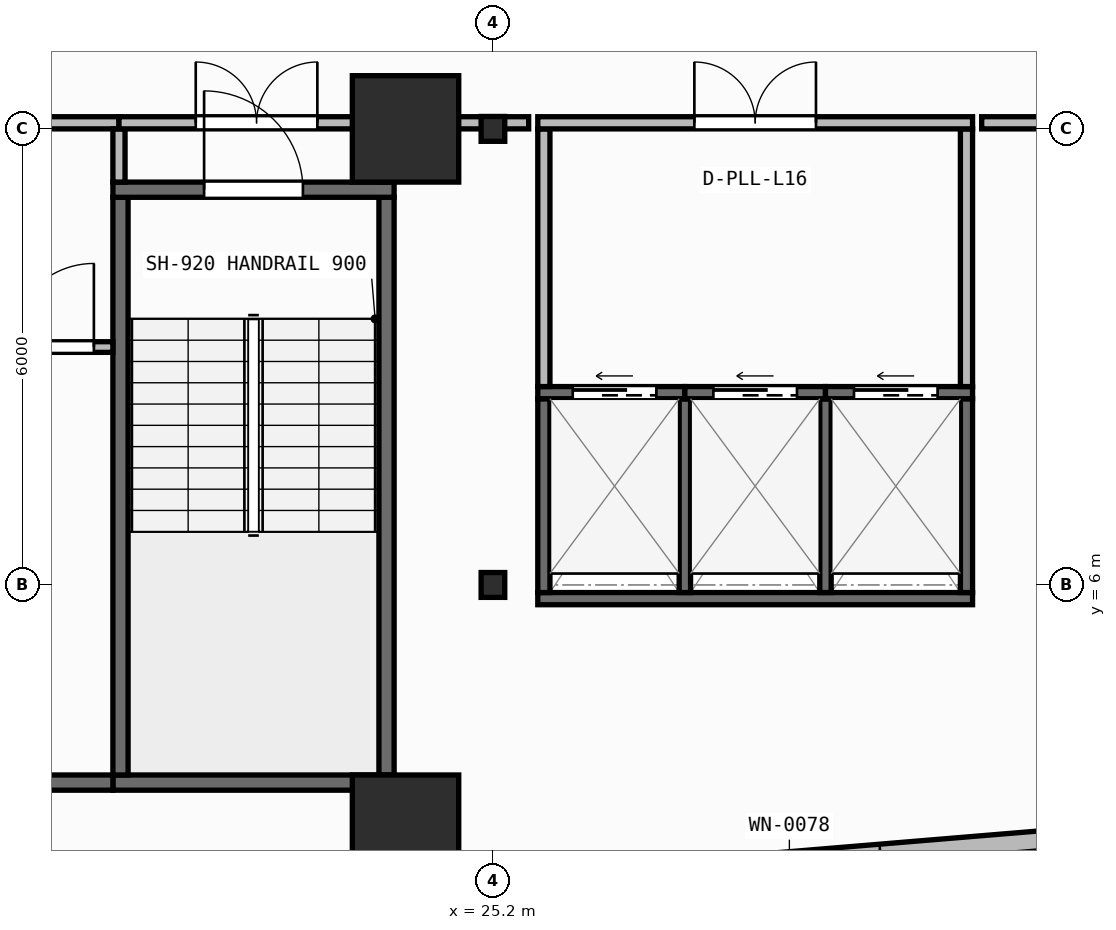
"""IFC4 building model, lengths in metres.
Left out: names, types, materials, properties, quantities, classifications, styles, units other than length and angle.
Written with IfcOpenShell. Run it as: python <this file> out.ifc"""

import sys

from ifc_helpers import new_model, si_unit, direction, frame, frame_2d, origin, origin_2d, place, context, subcontext, project, spatial, rectangle, i_section, extrude, element, fill, save


model = new_model("IFC4")
c1 = context("Model", 3, precision=1e-05, world=origin(), true_north=direction((0.0, 1.0)))
c2 = subcontext(c1, "Body", "Model", "MODEL_VIEW")
j1 = project(units=[si_unit("LENGTHUNIT", "METRE"), si_unit("PLANEANGLEUNIT", "RADIAN")], contexts=[c1])
p1 = place(None, origin())
s1 = spatial("IfcSite", under=j1, at=p1, CompositionType="ELEMENT")
p2 = place(p1, origin())
s2 = spatial("IfcBuilding", under=s1, at=p2, CompositionType="ELEMENT")
p3 = place(p2, frame((0.0, 0.0, 65.95)))
s3 = spatial("IfcBuildingStorey", under=s2, at=p3, CompositionType="ELEMENT", Elevation=65.95)
p4 = place(p3, frame((24.05, 2.8, 0.0), z_axis=(0.0, 0.0, 1.0), x_axis=(1.0, 0.0, 0.0)))
e1 = element("IfcColumn", 1, at=p4, inside=s3, PredefinedType="COLUMN", context=c2, shape_type="SweptSolid", body=[
    extrude(rectangle(XDim=1.4, YDim=1.4, at=origin_2d()), origin(), (0.0, 0.0, 1.0), 3.95),
])
p5 = place(p3, frame((25.2, 6.0, 0.0), z_axis=(0.0, 0.0, 1.0), x_axis=(1.0, 0.0, 0.0)))
e2 = element("IfcColumn", 2, at=p5, inside=s3, PredefinedType="COLUMN", context=c2, shape_type="SweptSolid", body=[
    extrude(i_section(OverallWidth=0.311, OverallDepth=0.327, WebThickness=0.016, FlangeThickness=0.025, FilletRadius=0.017, at=origin_2d()), origin(), (0.0, 0.0, 1.0), 3.95),
])
p6 = place(p3, frame((24.05, 12.0, 0.0), z_axis=(0.0, 0.0, 1.0), x_axis=(1.0, 0.0, 0.0)))
e3 = element("IfcColumn", 3, at=p6, inside=s3, PredefinedType="COLUMN", context=c2, shape_type="SweptSolid", body=[
    extrude(rectangle(XDim=1.4, YDim=1.4, at=origin_2d()), origin(), (0.0, 0.0, 1.0), 3.95),
])
p7 = place(p3, frame((25.2, 12.0, 0.0), z_axis=(0.0, 0.0, 1.0), x_axis=(1.0, 0.0, 0.0)))
e4 = element("IfcColumn", 4, at=p7, inside=s3, PredefinedType="COLUMN", context=c2, shape_type="SweptSolid", body=[
    extrude(i_section(OverallWidth=0.311, OverallDepth=0.327, WebThickness=0.016, FlangeThickness=0.025, FilletRadius=0.017, at=origin_2d()), origin(), (0.0, 0.0, 1.0), 3.95),
])
p8 = place(p3, frame((2.76, 0.174, 0.0), z_axis=(0.0, 0.0, 1.0), x_axis=(0.996571478456, 0.082736257641, 0.0)))
e5 = element("IfcWall", 5, at=p8, inside=s3, PredefinedType="STANDARD", context=c2, shape_type="SweptSolid", body=[
    extrude(rectangle(XDim=52.861, YDim=0.26, at=frame_2d((26.431, 0.0))), origin(), (0.0, 0.0, 1.0), 3.71),
])
p9 = place(p8, frame((25.231, 0.0, 0.9)))
e6 = element("IfcOpeningElement", 6, at=p9, cuts=e5, PredefinedType="OPENING", context=c2, shape_type="SweptSolid", body=[
    extrude(rectangle(XDim=2.4, YDim=1.65, at=frame_2d((1.2, 0.825))), frame((0.0, 0.14, 0.0), z_axis=(0.0, -1.0, 0.0), x_axis=(1.0, 0.0, 0.0)), (0.0, 0.0, 1.0), 0.28),
])
p10 = place(p3, frame((20.2, 3.4, 0.0), z_axis=(0.0, 0.0, 1.0), x_axis=(1.0, 0.0, 0.0)))
e7 = element("IfcWall", 7, at=p10, inside=s3, PredefinedType="SHEAR", context=c2, shape_type="SweptSolid", body=[
    extrude(rectangle(XDim=3.7, YDim=0.2, at=frame_2d((1.85, 0.0))), origin(), (0.0, 0.0, 1.0), 3.71),
])
for number, where, z_axis, x_axis in (
    (8, (20.3, 3.5, 0.0), (0.0, 0.0, 1.0), (0.0, 1.0, 0.0)),
    (9, (23.8, 3.5, 0.0), (0.0, 0.0, 1.0), (0.0, 1.0, 0.0)),
):
    element("IfcWall", number, at=place(p3, frame(where, z_axis=z_axis, x_axis=x_axis)), inside=s3, PredefinedType="SHEAR", context=c2, shape_type="SweptSolid", body=[
        extrude(rectangle(XDim=7.6, YDim=0.2, at=frame_2d((3.8, 0.0))), origin(), (0.0, 0.0, 1.0), 3.71),
    ])
p11 = place(p3, frame((20.2, 11.2, 0.0), z_axis=(0.0, 0.0, 1.0), x_axis=(1.0, 0.0, 0.0)))
e10 = element("IfcWall", 10, at=p11, inside=s3, PredefinedType="SHEAR", context=c2, shape_type="SweptSolid", body=[
    extrude(rectangle(XDim=3.7, YDim=0.2, at=frame_2d((1.85, 0.0))), origin(), (0.0, 0.0, 1.0), 3.71),
])
p12 = place(p11, frame((1.2, 0.0, 0.0)))
e11 = element("IfcOpeningElement", 11, at=p12, cuts=e10, PredefinedType="OPENING", context=c2, shape_type="SweptSolid", body=[
    extrude(rectangle(XDim=1.3, YDim=2.15, at=frame_2d((0.65, 1.075))), frame((0.0, 0.11, 0.0), z_axis=(0.0, -1.0, 0.0), x_axis=(1.0, 0.0, 0.0)), (0.0, 0.0, 1.0), 0.22),
])
p13 = place(p3, frame((6.5, 3.4, 0.0), z_axis=(0.0, 0.0, 1.0), x_axis=(1.0, 0.0, 0.0)))
e12 = element("IfcWall", 12, at=p13, inside=s3, PredefinedType="SHEAR", context=c2, shape_type="SweptSolid", body=[
    extrude(rectangle(XDim=13.7, YDim=0.2, at=frame_2d((6.85, 0.0))), origin(), (0.0, 0.0, 1.0), 3.71),
])
p14 = place(p3, frame((25.79, 5.82, 0.0), z_axis=(0.0, 0.0, 1.0), x_axis=(1.0, 0.0, 0.0)))
e13 = element("IfcWall", 13, at=p14, inside=s3, PredefinedType="SHEAR", context=c2, shape_type="SweptSolid", body=[
    extrude(rectangle(XDim=5.72, YDim=0.16, at=frame_2d((2.86, 0.0))), origin(), (0.0, 0.0, 1.0), 3.71),
])
for number, where, z_axis, x_axis in (
    (14, (25.87, 5.9, 0.0), (0.0, 0.0, 1.0), (0.0, 1.0, 0.0)),
    (15, (31.43, 5.9, 0.0), (0.0, 0.0, 1.0), (0.0, 1.0, 0.0)),
):
    element("IfcWall", number, at=place(p3, frame(where, z_axis=z_axis, x_axis=x_axis)), inside=s3, PredefinedType="SHEAR", context=c2, shape_type="SweptSolid", body=[
        extrude(rectangle(XDim=2.55, YDim=0.16, at=frame_2d((1.275, 0.0))), origin(), (0.0, 0.0, 1.0), 3.71),
    ])
for number, where, z_axis, x_axis in (
    (16, (27.725, 5.9, 0.0), (0.0, 0.0, 1.0), (0.0, 1.0, 0.0)),
    (17, (29.575, 5.9, 0.0), (0.0, 0.0, 1.0), (0.0, 1.0, 0.0)),
):
    element("IfcWall", number, at=place(p3, frame(where, z_axis=z_axis, x_axis=x_axis)), inside=s3, PredefinedType="SHEAR", context=c2, shape_type="SweptSolid", body=[
        extrude(rectangle(XDim=2.55, YDim=0.15, at=frame_2d((1.275, 0.0))), origin(), (0.0, 0.0, 1.0), 3.71),
    ])
p15 = place(p3, frame((25.79, 8.53, 0.0), z_axis=(0.0, 0.0, 1.0), x_axis=(1.0, 0.0, 0.0)))
e18 = element("IfcWall", 18, at=p15, inside=s3, PredefinedType="SHEAR", context=c2, shape_type="SweptSolid", body=[
    extrude(rectangle(XDim=1.935, YDim=0.16, at=frame_2d((0.968, 0.0))), origin(), (0.0, 0.0, 1.0), 3.71),
])
p16 = place(p15, frame((0.46, 0.0, 0.0)))
e19 = element("IfcOpeningElement", 19, at=p16, cuts=e18, PredefinedType="OPENING", context=c2, shape_type="SweptSolid", body=[
    extrude(rectangle(XDim=1.1, YDim=2.15, at=frame_2d((0.55, 1.075))), frame((0.0, 0.09, 0.0), z_axis=(0.0, -1.0, 0.0), x_axis=(1.0, 0.0, 0.0)), (0.0, 0.0, 1.0), 0.18),
])
p17 = place(p3, frame((27.725, 8.53, 0.0), z_axis=(0.0, 0.0, 1.0), x_axis=(1.0, 0.0, 0.0)))
e20 = element("IfcWall", 20, at=p17, inside=s3, PredefinedType="SHEAR", context=c2, shape_type="SweptSolid", body=[
    extrude(rectangle(XDim=1.85, YDim=0.16, at=frame_2d((0.925, 0.0))), origin(), (0.0, 0.0, 1.0), 3.71),
])
p18 = place(p17, frame((0.375, 0.0, 0.0)))
e21 = element("IfcOpeningElement", 21, at=p18, cuts=e20, PredefinedType="OPENING", context=c2, shape_type="SweptSolid", body=[
    extrude(rectangle(XDim=1.1, YDim=2.15, at=frame_2d((0.55, 1.075))), frame((0.0, 0.09, 0.0), z_axis=(0.0, -1.0, 0.0), x_axis=(1.0, 0.0, 0.0)), (0.0, 0.0, 1.0), 0.18),
])
p19 = place(p3, frame((29.575, 8.53, 0.0), z_axis=(0.0, 0.0, 1.0), x_axis=(1.0, 0.0, 0.0)))
e22 = element("IfcWall", 22, at=p19, inside=s3, PredefinedType="SHEAR", context=c2, shape_type="SweptSolid", body=[
    extrude(rectangle(XDim=1.935, YDim=0.16, at=frame_2d((0.968, 0.0))), origin(), (0.0, 0.0, 1.0), 3.71),
])
p20 = place(p19, frame((0.375, 0.0, 0.0)))
e23 = element("IfcOpeningElement", 23, at=p20, cuts=e22, PredefinedType="OPENING", context=c2, shape_type="SweptSolid", body=[
    extrude(rectangle(XDim=1.1, YDim=2.15, at=frame_2d((0.55, 1.075))), frame((0.0, 0.09, 0.0), z_axis=(0.0, -1.0, 0.0), x_axis=(1.0, 0.0, 0.0)), (0.0, 0.0, 1.0), 0.18),
])
p21 = place(p3, frame((18.61, 9.13, 0.0), z_axis=(0.0, 0.0, 1.0), x_axis=(1.0, 0.0, 0.0)))
e24 = element("IfcWall", 24, at=p21, inside=s3, PredefinedType="PARTITIONING", context=c2, shape_type="SweptSolid", body=[
    extrude(rectangle(XDim=1.59, YDim=0.14, at=frame_2d((0.795, 0.0))), origin(), (0.0, 0.0, 1.0), 3.71),
])
p22 = place(p21, frame((0.24, 0.0, 0.0)))
e25 = element("IfcOpeningElement", 25, at=p22, cuts=e24, PredefinedType="OPENING", context=c2, shape_type="SweptSolid", body=[
    extrude(rectangle(XDim=1.1, YDim=2.1, at=frame_2d((0.55, 1.05))), frame((0.0, 0.08, 0.0), z_axis=(0.0, -1.0, 0.0), x_axis=(1.0, 0.0, 0.0)), (0.0, 0.0, 1.0), 0.16),
])
p23 = place(p3, frame((12.58, 12.08, 0.0), z_axis=(0.0, 0.0, 1.0), x_axis=(1.0, 0.0, 0.0)))
e26 = element("IfcWall", 26, at=p23, inside=s3, PredefinedType="PARTITIONING", context=c2, shape_type="SweptSolid", body=[
    extrude(rectangle(XDim=7.7, YDim=0.16, at=frame_2d((3.85, 0.0))), origin(), (0.0, 0.0, 1.0), 3.073),
])
p24 = place(p23, frame((3.05, 0.0, 0.0)))
e27 = element("IfcOpeningElement", 27, at=p24, cuts=e26, PredefinedType="OPENING", context=c2, shape_type="SweptSolid", body=[
    extrude(rectangle(XDim=1.6, YDim=2.05, at=frame_2d((0.8, 1.025))), frame((0.0, 0.09, 0.0), z_axis=(0.0, -1.0, 0.0), x_axis=(1.0, 0.0, 0.0)), (0.0, 0.0, 1.0), 0.18),
])
p25 = place(p3, frame((20.28, 11.3, 0.0), z_axis=(0.0, 0.0, 1.0), x_axis=(0.0, 1.0, 0.0)))
e28 = element("IfcWall", 28, at=p25, inside=s3, PredefinedType="PARTITIONING", context=c2, shape_type="SweptSolid", body=[
    extrude(rectangle(XDim=0.7, YDim=0.16, at=frame_2d((0.35, 0.0))), origin(), (0.0, 0.0, 1.0), 3.71),
])
p26 = place(p3, frame((20.28, 12.08, 0.0), z_axis=(0.0, 0.0, 1.0), x_axis=(1.0, 0.0, 0.0)))
e29 = element("IfcWall", 29, at=p26, inside=s3, PredefinedType="PARTITIONING", context=c2, shape_type="SweptSolid", body=[
    extrude(rectangle(XDim=3.62, YDim=0.16, at=frame_2d((1.81, 0.0))), origin(), (0.0, 0.0, 1.0), 3.073),
])
p27 = place(p26, frame((1.01, 0.0, 0.0)))
e30 = element("IfcOpeningElement", 30, at=p27, cuts=e29, PredefinedType="OPENING", context=c2, shape_type="SweptSolid", body=[
    extrude(rectangle(XDim=1.6, YDim=2.05, at=frame_2d((0.8, 1.025))), frame((0.0, 0.09, 0.0), z_axis=(0.0, -1.0, 0.0), x_axis=(1.0, 0.0, 0.0)), (0.0, 0.0, 1.0), 0.18),
])
p28 = place(p3, frame((23.82, 11.3, 0.0), z_axis=(0.0, 0.0, 1.0), x_axis=(0.0, 1.0, 0.0)))
e31 = element("IfcWall", 31, at=p28, inside=s3, PredefinedType="PARTITIONING", context=c2, shape_type="SweptSolid", body=[
    extrude(rectangle(XDim=0.7, YDim=0.16, at=frame_2d((0.35, 0.0))), origin(), (0.0, 0.0, 1.0), 3.71),
])
for number, where, z_axis, x_axis in (
    (32, (25.87, 8.61, 0.0), (0.0, 0.0, 1.0), (0.0, 1.0, 0.0)),
    (33, (31.43, 8.61, 0.0), (0.0, 0.0, 1.0), (0.0, 1.0, 0.0)),
):
    element("IfcWall", number, at=place(p3, frame(where, z_axis=z_axis, x_axis=x_axis)), inside=s3, PredefinedType="PARTITIONING", context=c2, shape_type="SweptSolid", body=[
        extrude(rectangle(XDim=3.39, YDim=0.16, at=frame_2d((1.695, 0.0))), origin(), (0.0, 0.0, 1.0), 3.71),
    ])
p29 = place(p3, frame((25.79, 12.08, 0.0), z_axis=(0.0, 0.0, 1.0), x_axis=(1.0, 0.0, 0.0)))
e34 = element("IfcWall", 34, at=p29, inside=s3, PredefinedType="PARTITIONING", context=c2, shape_type="SweptSolid", body=[
    extrude(rectangle(XDim=5.72, YDim=0.16, at=frame_2d((2.86, 0.0))), origin(), (0.0, 0.0, 1.0), 3.073),
])
p30 = place(p29, frame((2.06, 0.0, 0.0)))
e35 = element("IfcOpeningElement", 35, at=p30, cuts=e34, PredefinedType="OPENING", context=c2, shape_type="SweptSolid", body=[
    extrude(rectangle(XDim=1.6, YDim=2.05, at=frame_2d((0.8, 1.025))), frame((0.0, 0.09, 0.0), z_axis=(0.0, -1.0, 0.0), x_axis=(1.0, 0.0, 0.0)), (0.0, 0.0, 1.0), 0.18),
])
p31 = place(p3, frame((24.02, 12.08, 0.0), z_axis=(0.0, 0.0, 1.0), x_axis=(1.0, 0.0, 0.0)))
e36 = element("IfcWall", 36, at=p31, inside=s3, PredefinedType="PARTITIONING", context=c2, shape_type="SweptSolid", body=[
    extrude(rectangle(XDim=1.65, YDim=0.16, at=frame_2d((0.825, 0.0))), origin(), (0.0, 0.0, 1.0), 3.073),
])
p32 = place(p3, frame((31.63, 12.08, 0.0), z_axis=(0.0, 0.0, 1.0), x_axis=(1.0, 0.0, 0.0)))
e37 = element("IfcWall", 37, at=p32, inside=s3, PredefinedType="PARTITIONING", context=c2, shape_type="SweptSolid", body=[
    extrude(rectangle(XDim=11.181, YDim=0.16, at=frame_2d((5.59, 0.0))), origin(), (0.0, 0.0, 1.0), 3.073),
])
p33 = place(p12, origin())
e38 = element("IfcDoor", 38, at=p33, inside=s3, OperationType="SINGLE_SWING_LEFT", PredefinedType="DOOR", context=c2, shape_type="SweptSolid", body=[
    extrude(rectangle(XDim=1.3, YDim=2.15, at=frame_2d((0.65, 1.075))), frame((0.0, 0.025, 0.0), z_axis=(0.0, -1.0, 0.0), x_axis=(1.0, 0.0, 0.0)), (0.0, 0.0, 1.0), 0.05),
])
fill(e11, e38)
p34 = place(p16, origin())
e39 = element("IfcDoor", 39, at=p34, inside=s3, OperationType="SLIDING_TO_LEFT", PredefinedType="DOOR", context=c2, shape_type="SweptSolid", body=[
    extrude(rectangle(XDim=1.1, YDim=2.15, at=frame_2d((0.55, 1.075))), frame((0.0, 0.025, 0.0), z_axis=(0.0, -1.0, 0.0), x_axis=(1.0, 0.0, 0.0)), (0.0, 0.0, 1.0), 0.05),
])
fill(e19, e39)
p35 = place(p18, origin())
e40 = element("IfcDoor", 40, at=p35, inside=s3, OperationType="SLIDING_TO_LEFT", PredefinedType="DOOR", context=c2, shape_type="SweptSolid", body=[
    extrude(rectangle(XDim=1.1, YDim=2.15, at=frame_2d((0.55, 1.075))), frame((0.0, 0.025, 0.0), z_axis=(0.0, -1.0, 0.0), x_axis=(1.0, 0.0, 0.0)), (0.0, 0.0, 1.0), 0.05),
])
fill(e21, e40)
p36 = place(p20, origin())
e41 = element("IfcDoor", 41, at=p36, inside=s3, OperationType="SLIDING_TO_LEFT", PredefinedType="DOOR", context=c2, shape_type="SweptSolid", body=[
    extrude(rectangle(XDim=1.1, YDim=2.15, at=frame_2d((0.55, 1.075))), frame((0.0, 0.025, 0.0), z_axis=(0.0, -1.0, 0.0), x_axis=(1.0, 0.0, 0.0)), (0.0, 0.0, 1.0), 0.05),
])
fill(e23, e41)
p37 = place(p22, origin())
e42 = element("IfcDoor", 42, at=p37, inside=s3, OperationType="SINGLE_SWING_RIGHT", PredefinedType="DOOR", context=c2, shape_type="SweptSolid", body=[
    extrude(rectangle(XDim=1.1, YDim=2.1, at=frame_2d((0.55, 1.05))), frame((0.0, 0.025, 0.0), z_axis=(0.0, -1.0, 0.0), x_axis=(1.0, 0.0, 0.0)), (0.0, 0.0, 1.0), 0.05),
])
fill(e25, e42)
p38 = place(p27, origin())
e43 = element("IfcDoor", 43, at=p38, inside=s3, OperationType="DOUBLE_DOOR_SINGLE_SWING", PredefinedType="DOOR", context=c2, shape_type="SweptSolid", body=[
    extrude(rectangle(XDim=1.6, YDim=2.05, at=frame_2d((0.8, 1.025))), frame((0.0, 0.025, 0.0), z_axis=(0.0, -1.0, 0.0), x_axis=(1.0, 0.0, 0.0)), (0.0, 0.0, 1.0), 0.05),
])
fill(e30, e43)
p39 = place(p30, origin())
e44 = element("IfcDoor", 44, at=p39, inside=s3, OperationType="DOUBLE_DOOR_SINGLE_SWING", PredefinedType="DOOR", context=c2, shape_type="SweptSolid", body=[
    extrude(rectangle(XDim=1.6, YDim=2.05, at=frame_2d((0.8, 1.025))), frame((0.0, 0.025, 0.0), z_axis=(0.0, -1.0, 0.0), x_axis=(1.0, 0.0, 0.0)), (0.0, 0.0, 1.0), 0.05),
])
fill(e35, e44)
save(model, sys.argv[1])
